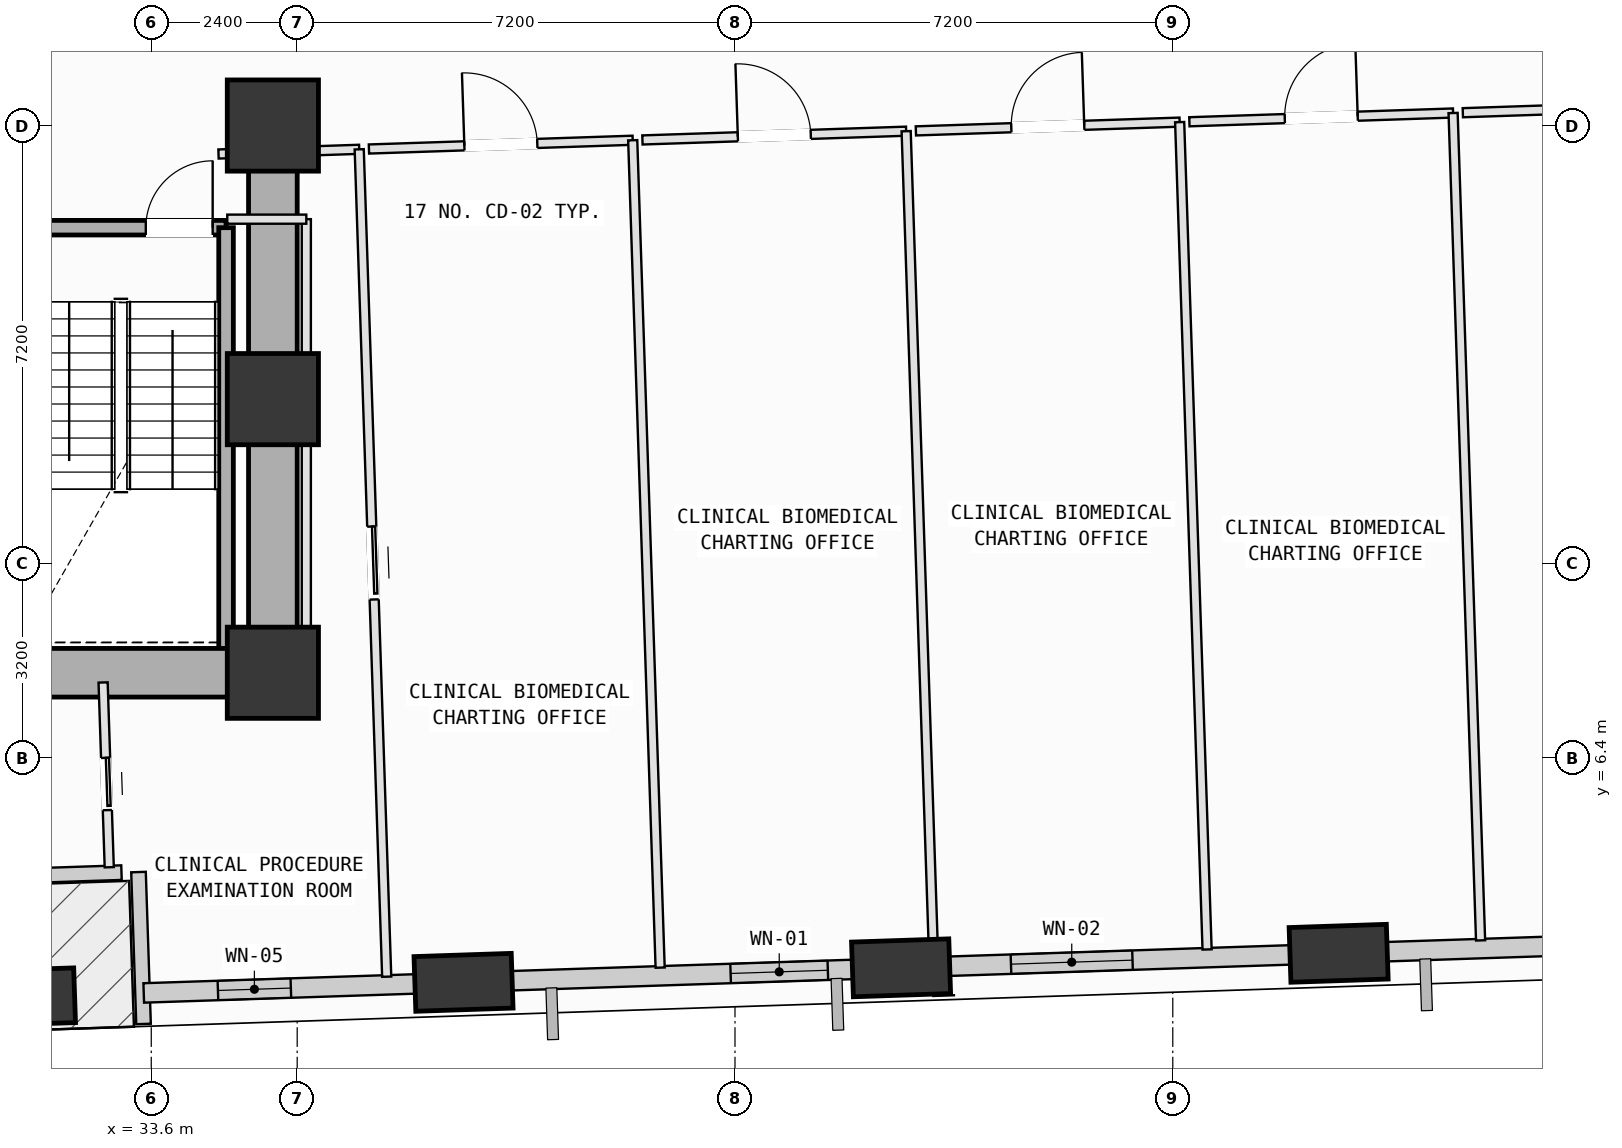
"""IFC4 building model, lengths in metres.
Left out: names, types, materials, properties, quantities, classifications, styles, units other than length and angle.
Written with IfcOpenShell. Run it as: python <this file> out.ifc"""

import sys

from ifc_helpers import new_model, si_unit, direction, frame, frame_2d, origin, origin_2d, place, context, subcontext, project, spatial, rectangle, extrude, element, fill, save


model = new_model("IFC4")
c1 = context("Model", 3, precision=1e-05, world=origin(), true_north=direction((0.0, 1.0)))
c2 = subcontext(c1, "Body", "Model", "MODEL_VIEW")
j1 = project(units=[si_unit("LENGTHUNIT", "METRE"), si_unit("PLANEANGLEUNIT", "RADIAN")], contexts=[c1])
p1 = place(None, origin())
s1 = spatial("IfcSite", under=j1, at=p1, CompositionType="ELEMENT")
p2 = place(p1, origin())
s2 = spatial("IfcBuilding", under=s1, at=p2, CompositionType="ELEMENT")
p3 = place(p2, frame((0.0, 0.0, 31.0)))
s3 = spatial("IfcBuildingStorey", under=s2, at=p3, CompositionType="ELEMENT", Elevation=31.0)
for number, where, z_axis, x_axis in (
    (1, (35.6, 7.8, 0.0), (0.0, 0.0, 1.0), (1.0, 0.0, 0.0)),
    (2, (35.6, 12.3, 0.0), (0.0, 0.0, 1.0), (1.0, 0.0, 0.0)),
    (3, (35.6, 16.8, 0.0), (0.0, 0.0, 1.0), (1.0, 0.0, 0.0)),
):
    element("IfcColumn", number, at=place(p3, frame(where, z_axis=z_axis, x_axis=x_axis)), inside=s3, PredefinedType="COLUMN", context=c2, shape_type="SweptSolid", body=[
        extrude(rectangle(XDim=1.5, YDim=1.5, at=origin_2d()), origin(), (0.0, 0.0, 1.0), 4.0),
    ])
p4 = place(p3, frame((31.539, 2.469, 0.002), z_axis=(0.092271359153, -0.007785586006, 0.995703460339), x_axis=(0.051136235905, 0.998686967769, 0.003070144289)))
e4 = element("IfcColumn", 4, at=p4, inside=s3, PredefinedType="COLUMN", context=c2, shape_type="SweptSolid", body=[
    extrude(rectangle(XDim=1.6, YDim=0.9, at=origin_2d()), origin(), (0.0, 0.0, 1.0), 4.014),
])
p5 = place(p3, frame((38.735, 2.708, 0.002), z_axis=(0.090985631016, 0.021894937945, 0.995611483783), x_axis=(-0.265927712574, 0.963987979471, 0.003102760257)))
e5 = element("IfcColumn", 5, at=p5, inside=s3, PredefinedType="COLUMN", context=c2, shape_type="SweptSolid", body=[
    extrude(rectangle(XDim=1.6, YDim=0.9, at=origin_2d()), origin(), (0.0, 0.0, 1.0), 4.014),
])
p6 = place(p3, frame((45.931, 2.947, 0.002), z_axis=(0.089681088659, 0.051584853842, 0.994633754299), x_axis=(-0.526915084998, 0.849911011221, 0.003430190405)))
e6 = element("IfcColumn", 6, at=p6, inside=s3, PredefinedType="COLUMN", context=c2, shape_type="SweptSolid", body=[
    extrude(rectangle(XDim=1.6, YDim=0.9, at=origin_2d()), origin(), (0.0, 0.0, 1.0), 4.018),
])
p7 = place(p3, frame((53.127, 3.186, 0.002), z_axis=(0.088301732814, 0.081084764267, 0.99278802621), x_axis=(-0.700238789355, 0.713897639235, 0.003974742434)))
e7 = element("IfcColumn", 7, at=p7, inside=s3, PredefinedType="COLUMN", context=c2, shape_type="SweptSolid", body=[
    extrude(rectangle(XDim=1.6, YDim=0.9, at=origin_2d()), origin(), (0.0, 0.0, 1.0), 4.026),
])
p8 = place(p3, frame((33.11, 4.513, 0.0), z_axis=(0.0, 0.0, 1.0), x_axis=(-0.999450421649, -0.033148976852, 0.0)))
e8 = element("IfcWall", 8, at=p8, inside=s3, PredefinedType="SOLIDWALL", context=c2, shape_type="SweptSolid", body=[
    extrude(rectangle(XDim=6.96, YDim=0.24, at=frame_2d((3.48, 0.0))), origin(), (0.0, 0.0, 1.0), 3.165),
])
p9 = place(p8, frame((2.93, 0.0, 0.0)))
e9 = element("IfcOpeningElement", 9, at=p9, cuts=e8, PredefinedType="OPENING", context=c2, shape_type="SweptSolid", body=[
    extrude(rectangle(XDim=1.1, YDim=2.15, at=frame_2d((0.55, 1.075))), frame((0.0, 0.13, 0.0), z_axis=(0.0, -1.0, 0.0), x_axis=(1.0, 0.0, 0.0)), (0.0, 0.0, 1.0), 0.26),
])
p10 = place(p3, frame((33.473, 2.023, 0.0), z_axis=(0.0, 0.0, 1.0), x_axis=(-0.033201031352, 0.999448693789, 0.0)))
e10 = element("IfcWall", 10, at=p10, inside=s3, PredefinedType="SOLIDWALL", context=c2, shape_type="SweptSolid", body=[
    extrude(rectangle(XDim=2.5, YDim=0.24, at=frame_2d((1.25, 0.0))), origin(), (0.0, 0.0, 1.0), 3.165),
])
p11 = place(p3, frame((38.313, 2.694, 0.0), z_axis=(0.0, 0.0, 1.0), x_axis=(-0.999450547825, -0.033145172375, 0.0)))
e11 = element("IfcWall", 11, at=p11, inside=s3, PredefinedType="SOLIDWALL", context=c2, shape_type="SweptSolid", body=[
    extrude(rectangle(XDim=4.839, YDim=0.32, at=frame_2d((2.42, 0.0))), origin(), (0.0, 0.0, 1.0), 3.145),
])
p12 = place(p11, frame((2.418, 0.0, 0.75)))
e12 = element("IfcOpeningElement", 12, at=p12, cuts=e11, PredefinedType="OPENING", context=c2, shape_type="SweptSolid", body=[
    extrude(rectangle(XDim=1.2, YDim=1.75, at=frame_2d((0.6, 0.875))), frame((0.0, 0.17, 0.0), z_axis=(0.0, -1.0, 0.0), x_axis=(1.0, 0.0, 0.0)), (0.0, 0.0, 1.0), 0.34),
])
p13 = place(p3, frame((45.515, 2.933, 0.0), z_axis=(0.0, 0.0, 1.0), x_axis=(-0.999450004557, -0.033161549901, 0.0)))
e13 = element("IfcWall", 13, at=p13, inside=s3, PredefinedType="SOLIDWALL", context=c2, shape_type="SweptSolid", body=[
    extrude(rectangle(XDim=5.993, YDim=0.32, at=frame_2d((2.997, 0.0))), origin(), (0.0, 0.0, 1.0), 3.145),
])
p14 = place(p13, frame((0.789, 0.0, 0.75)))
e14 = element("IfcOpeningElement", 14, at=p14, cuts=e13, PredefinedType="OPENING", context=c2, shape_type="SweptSolid", body=[
    extrude(rectangle(XDim=1.6, YDim=1.95, at=frame_2d((0.8, 0.975))), frame((0.0, 0.17, 0.0), z_axis=(0.0, -1.0, 0.0), x_axis=(1.0, 0.0, 0.0)), (0.0, 0.0, 1.0), 0.34),
])
p15 = place(p3, frame((52.724, 3.172, 0.0), z_axis=(0.0, 0.0, 1.0), x_axis=(-0.999450884899, -0.033135006788, 0.0)))
e15 = element("IfcWall", 15, at=p15, inside=s3, PredefinedType="SOLIDWALL", context=c2, shape_type="SweptSolid", body=[
    extrude(rectangle(XDim=6.012, YDim=0.32, at=frame_2d((3.006, 0.0))), origin(), (0.0, 0.0, 1.0), 2.865),
])
p16 = place(p15, frame((2.988, 0.0, 0.75)))
e16 = element("IfcOpeningElement", 16, at=p16, cuts=e15, PredefinedType="OPENING", context=c2, shape_type="SweptSolid", body=[
    extrude(rectangle(XDim=2.0, YDim=1.95, at=frame_2d((1.0, 0.975))), frame((0.0, 0.17, 0.0), z_axis=(0.0, -1.0, 0.0), x_axis=(1.0, 0.0, 0.0)), (0.0, 0.0, 1.0), 0.34),
])
p17 = place(p3, frame((59.938, 3.412, 0.0), z_axis=(0.0, 0.0, 1.0), x_axis=(-0.999450050227, -0.033160173418, 0.0)))
e17 = element("IfcWall", 17, at=p17, inside=s3, PredefinedType="SOLIDWALL", context=c2, shape_type="SweptSolid", body=[
    extrude(rectangle(XDim=6.045, YDim=0.32, at=frame_2d((3.022, 0.0))), origin(), (0.0, 0.0, 1.0), 2.865),
])
p18 = place(p17, frame((1.361, 0.0, 0.75)))
e18 = element("IfcOpeningElement", 18, at=p18, cuts=e17, PredefinedType="OPENING", context=c2, shape_type="SweptSolid", body=[
    extrude(rectangle(XDim=1.4, YDim=1.85, at=frame_2d((0.7, 0.925))), frame((0.0, 0.17, 0.0), z_axis=(0.0, -1.0, 0.0), x_axis=(1.0, 0.0, 0.0)), (0.0, 0.0, 1.0), 0.34),
])
p19 = place(p3, frame((31.37, 15.12, 0.0), z_axis=(0.0, 0.0, 1.0), x_axis=(1.0, 0.0, 0.0)))
e19 = element("IfcWall", 19, at=p19, inside=s3, PredefinedType="SOLIDWALL", context=c2, shape_type="SweptSolid", body=[
    extrude(rectangle(XDim=3.46, YDim=0.24, at=frame_2d((1.73, 0.0))), origin(), (0.0, 0.0, 1.0), 3.78),
])
p20 = place(p19, frame((2.14, 0.0, 0.0)))
e20 = element("IfcOpeningElement", 20, at=p20, cuts=e19, PredefinedType="OPENING", context=c2, shape_type="SweptSolid", body=[
    extrude(rectangle(XDim=1.1, YDim=2.15, at=frame_2d((0.55, 1.075))), frame((0.0, 0.13, 0.0), z_axis=(0.0, -1.0, 0.0), x_axis=(1.0, 0.0, 0.0)), (0.0, 0.0, 1.0), 0.26),
])
p21 = place(p3, frame((34.83, 15.12, 0.0), z_axis=(0.0, 0.0, 1.0), x_axis=(0.0, -1.0, 0.0)))
e21 = element("IfcWall", 21, at=p21, inside=s3, PredefinedType="SOLIDWALL", context=c2, shape_type="SweptSolid", body=[
    extrude(rectangle(XDim=6.92, YDim=0.24, at=frame_2d((3.46, 0.0))), origin(), (0.0, 0.0, 1.0), 3.78),
])
p22 = place(p3, frame((24.8, 7.8, 0.0), z_axis=(0.0, 0.0, 1.0), x_axis=(1.0, 0.0, 0.0)))
e22 = element("IfcWall", 22, at=p22, inside=s3, PredefinedType="SHEAR", context=c2, shape_type="SweptSolid", body=[
    extrude(rectangle(XDim=10.8, YDim=0.8, at=frame_2d((5.4, 0.0))), origin(), (0.0, 0.0, 1.0), 3.78),
])
p23 = place(p3, frame((35.6, 7.8, 0.0), z_axis=(0.0, 0.0, 1.0), x_axis=(0.0, 1.0, 0.0)))
e23 = element("IfcWall", 23, at=p23, inside=s3, PredefinedType="SHEAR", context=c2, shape_type="SweptSolid", body=[
    extrude(rectangle(XDim=9.0, YDim=0.8, at=frame_2d((4.5, 0.0))), origin(), (0.0, 0.0, 1.0), 3.78),
])
p24 = place(p3, frame((32.808, 7.64, 0.0), z_axis=(0.0, 0.0, 1.0), x_axis=(0.033162435907, -0.999449975159, 0.0)))
e24 = element("IfcWall", 24, at=p24, inside=s3, PredefinedType="PARTITIONING", context=c2, shape_type="SweptSolid", body=[
    extrude(rectangle(XDim=3.041, YDim=0.15, at=frame_2d((1.52, 0.0))), origin(), (0.0, 0.0, 1.0), 3.78),
])
p25 = place(p24, frame((1.24, 0.0, 0.0)))
e25 = element("IfcOpeningElement", 25, at=p25, cuts=e24, PredefinedType="OPENING", context=c2, shape_type="SweptSolid", body=[
    extrude(rectangle(XDim=0.86, YDim=2.06, at=frame_2d((0.43, 1.03))), frame((0.0, 0.085, 0.0), z_axis=(0.0, -1.0, 0.0), x_axis=(1.0, 0.0, 0.0)), (0.0, 0.0, 1.0), 0.17),
])
p26 = place(p3, frame((35.6, 7.5, 0.0), z_axis=(0.0, 0.0, 1.0), x_axis=(1.0, 0.0, 0.0)))
e26 = element("IfcWall", 26, at=p26, inside=s3, PredefinedType="PARTITIONING", context=c2, shape_type="SweptSolid", body=[
    extrude(rectangle(XDim=0.55, YDim=0.15, at=frame_2d((0.275, 0.0))), origin(), (0.0, 0.0, 1.0), 2.865),
])
p27 = place(p3, frame((36.15, 7.5, 0.0), z_axis=(0.0, 0.0, 1.0), x_axis=(0.0, 1.0, 0.0)))
e27 = element("IfcWall", 27, at=p27, inside=s3, PredefinedType="PARTITIONING", context=c2, shape_type="SweptSolid", body=[
    extrude(rectangle(XDim=7.76, YDim=0.15, at=frame_2d((3.88, 0.0))), origin(), (0.0, 0.0, 1.0), 3.78),
])
p28 = place(p3, frame((36.15, 15.26, 0.0), z_axis=(0.0, 0.0, 1.0), x_axis=(-1.0, 0.0, 0.0)))
e28 = element("IfcWall", 28, at=p28, inside=s3, PredefinedType="PARTITIONING", context=c2, shape_type="SweptSolid", body=[
    extrude(rectangle(XDim=1.3, YDim=0.15, at=frame_2d((0.65, 0.0))), origin(), (0.0, 0.0, 1.0), 3.78),
])
p29 = place(p3, frame((34.706, 16.332, 0.0), z_axis=(0.0, 0.0, 1.0), x_axis=(0.999448179147, 0.033216519986, 0.0)))
e29 = element("IfcWall", 29, at=p29, inside=s3, PredefinedType="PARTITIONING", context=c2, shape_type="SweptSolid", body=[
    extrude(rectangle(XDim=2.315, YDim=0.15, at=frame_2d((1.158, 0.0))), origin(), (0.0, 0.0, 1.0), 2.865),
])
p30 = place(p3, frame((37.02, 16.409, 0.0), z_axis=(0.0, 0.0, 1.0), x_axis=(0.033190644995, -0.999449038763, 0.0)))
e30 = element("IfcWall", 30, at=p30, inside=s3, PredefinedType="PARTITIONING", context=c2, shape_type="SweptSolid", body=[
    extrude(rectangle(XDim=13.615, YDim=0.15, at=frame_2d((6.808, 0.0))), origin(), (0.0, 0.0, 1.0), 3.78),
])
p31 = place(p30, frame((6.208, 0.0, 0.0)))
e31 = element("IfcOpeningElement", 31, at=p31, cuts=e30, PredefinedType="OPENING", context=c2, shape_type="SweptSolid", body=[
    extrude(rectangle(XDim=1.2, YDim=2.15, at=frame_2d((0.6, 1.075))), frame((0.0, 0.085, 0.0), z_axis=(0.0, -1.0, 0.0), x_axis=(1.0, 0.0, 0.0)), (0.0, 0.0, 1.0), 0.17),
])
p32 = place(p3, frame((37.18, 16.414, 0.0), z_axis=(0.0, 0.0, 1.0), x_axis=(0.999449206093, 0.03318560592, 0.0)))
e32 = element("IfcWall", 32, at=p32, inside=s3, PredefinedType="PARTITIONING", context=c2, shape_type="SweptSolid", body=[
    extrude(rectangle(XDim=4.341, YDim=0.15, at=frame_2d((2.17, 0.0))), origin(), (0.0, 0.0, 1.0), 3.78),
])
p33 = place(p32, frame((1.57, 0.0, 0.0)))
e33 = element("IfcOpeningElement", 33, at=p33, cuts=e32, PredefinedType="OPENING", context=c2, shape_type="SweptSolid", body=[
    extrude(rectangle(XDim=1.2, YDim=2.15, at=frame_2d((0.6, 1.075))), frame((0.0, 0.085, 0.0), z_axis=(0.0, -1.0, 0.0), x_axis=(1.0, 0.0, 0.0)), (0.0, 0.0, 1.0), 0.17),
])
p34 = place(p3, frame((41.518, 16.558, 0.0), z_axis=(0.0, 0.0, 1.0), x_axis=(0.033118405438, -0.999451435149, 0.0)))
e34 = element("IfcWall", 34, at=p34, inside=s3, PredefinedType="PARTITIONING", context=c2, shape_type="SweptSolid", body=[
    extrude(rectangle(XDim=13.616, YDim=0.15, at=frame_2d((6.808, 0.0))), origin(), (0.0, 0.0, 1.0), 3.78),
])
p35 = place(p3, frame((39.533, 2.505, 0.0), z_axis=(0.0, 0.0, 1.0), x_axis=(-0.999434580293, -0.033623202036, 0.0)))
e35 = element("IfcWall", 35, at=p35, inside=s3, PredefinedType="PARTITIONING", context=c2, shape_type="SweptSolid", body=[
    extrude(rectangle(XDim=1.213, YDim=0.15, at=frame_2d((0.606, 0.0))), origin(), (0.0, 0.0, 1.0), 3.145),
])
p36 = place(p3, frame((41.678, 16.563, 0.0), z_axis=(0.0, 0.0, 1.0), x_axis=(0.999448896244, 0.03319493632, 0.0)))
e36 = element("IfcWall", 36, at=p36, inside=s3, PredefinedType="PARTITIONING", context=c2, shape_type="SweptSolid", body=[
    extrude(rectangle(XDim=4.339, YDim=0.15, at=frame_2d((2.17, 0.0))), origin(), (0.0, 0.0, 1.0), 3.78),
])
p37 = place(p36, frame((1.57, 0.0, 0.0)))
e37 = element("IfcOpeningElement", 37, at=p37, cuts=e36, PredefinedType="OPENING", context=c2, shape_type="SweptSolid", body=[
    extrude(rectangle(XDim=1.2, YDim=2.15, at=frame_2d((0.6, 1.075))), frame((0.0, 0.085, 0.0), z_axis=(0.0, -1.0, 0.0), x_axis=(1.0, 0.0, 0.0)), (0.0, 0.0, 1.0), 0.17),
])
p38 = place(p3, frame((46.015, 16.707, 0.0), z_axis=(0.0, 0.0, 1.0), x_axis=(0.033199113875, -0.999448757485, 0.0)))
e38 = element("IfcWall", 38, at=p38, inside=s3, PredefinedType="PARTITIONING", context=c2, shape_type="SweptSolid", body=[
    extrude(rectangle(XDim=13.98, YDim=0.15, at=frame_2d((6.99, 0.0))), origin(), (0.0, 0.0, 1.0), 3.78),
])
p39 = place(p3, frame((46.479, 2.735, 0.0), z_axis=(0.0, 0.0, 1.0), x_axis=(-0.999432373579, -0.033688731694, 0.0)))
e39 = element("IfcWall", 39, at=p39, inside=s3, PredefinedType="PARTITIONING", context=c2, shape_type="SweptSolid", body=[
    extrude(rectangle(XDim=0.957, YDim=0.15, at=frame_2d((0.478, 0.0))), origin(), (0.0, 0.0, 1.0), 3.165),
])
p40 = place(p3, frame((46.175, 16.712, 0.0), z_axis=(0.0, 0.0, 1.0), x_axis=(0.999449144144, 0.033187471581, 0.0)))
e40 = element("IfcWall", 40, at=p40, inside=s3, PredefinedType="PARTITIONING", context=c2, shape_type="SweptSolid", body=[
    extrude(rectangle(XDim=4.34, YDim=0.15, at=frame_2d((2.17, 0.0))), origin(), (0.0, 0.0, 1.0), 3.78),
])
p41 = place(p40, frame((1.57, 0.0, 0.0)))
e41 = element("IfcOpeningElement", 41, at=p41, cuts=e40, PredefinedType="OPENING", context=c2, shape_type="SweptSolid", body=[
    extrude(rectangle(XDim=1.2, YDim=2.15, at=frame_2d((0.6, 1.075))), frame((0.0, 0.085, 0.0), z_axis=(0.0, -1.0, 0.0), x_axis=(1.0, 0.0, 0.0)), (0.0, 0.0, 1.0), 0.17),
])
p42 = place(p3, frame((50.513, 16.856, 0.0), z_axis=(0.0, 0.0, 1.0), x_axis=(0.033139286129, -0.999450743016, 0.0)))
e42 = element("IfcWall", 42, at=p42, inside=s3, PredefinedType="PARTITIONING", context=c2, shape_type="SweptSolid", body=[
    extrude(rectangle(XDim=13.615, YDim=0.15, at=frame_2d((6.807, 0.0))), origin(), (0.0, 0.0, 1.0), 3.78),
])
p43 = place(p3, frame((50.673, 16.862, 0.0), z_axis=(0.0, 0.0, 1.0), x_axis=(0.999448896244, 0.03319493632, 0.0)))
e43 = element("IfcWall", 43, at=p43, inside=s3, PredefinedType="PARTITIONING", context=c2, shape_type="SweptSolid", body=[
    extrude(rectangle(XDim=4.339, YDim=0.15, at=frame_2d((2.17, 0.0))), origin(), (0.0, 0.0, 1.0), 3.78),
])
p44 = place(p43, frame((1.57, 0.0, 0.0)))
e44 = element("IfcOpeningElement", 44, at=p44, cuts=e43, PredefinedType="OPENING", context=c2, shape_type="SweptSolid", body=[
    extrude(rectangle(XDim=1.2, YDim=2.15, at=frame_2d((0.6, 1.075))), frame((0.0, 0.085, 0.0), z_axis=(0.0, -1.0, 0.0), x_axis=(1.0, 0.0, 0.0)), (0.0, 0.0, 1.0), 0.17),
])
p45 = place(p3, frame((55.01, 17.006, 0.0), z_axis=(0.0, 0.0, 1.0), x_axis=(0.033190050186, -0.999449058516, 0.0)))
e45 = element("IfcWall", 45, at=p45, inside=s3, PredefinedType="PARTITIONING", context=c2, shape_type="SweptSolid", body=[
    extrude(rectangle(XDim=13.616, YDim=0.15, at=frame_2d((6.808, 0.0))), origin(), (0.0, 0.0, 1.0), 3.78),
])
p46 = place(p3, frame((53.905, 2.981, 0.0), z_axis=(0.0, 0.0, 1.0), x_axis=(-0.999446981017, -0.033252550834, 0.0)))
e46 = element("IfcWall", 46, at=p46, inside=s3, PredefinedType="PARTITIONING", context=c2, shape_type="SweptSolid", body=[
    extrude(rectangle(XDim=1.175, YDim=0.15, at=frame_2d((0.587, 0.0))), origin(), (0.0, 0.0, 1.0), 3.78),
])
p47 = place(p3, frame((55.17, 17.011, 0.0), z_axis=(0.0, 0.0, 1.0), x_axis=(0.999449543268, 0.033175449669, 0.0)))
e47 = element("IfcWall", 47, at=p47, inside=s3, PredefinedType="PARTITIONING", context=c2, shape_type="SweptSolid", body=[
    extrude(rectangle(XDim=6.24, YDim=0.15, at=frame_2d((3.12, 0.0))), origin(), (0.0, 0.0, 1.0), 3.78),
])
p48 = place(p47, frame((2.52, 0.0, 0.0)))
e48 = element("IfcOpeningElement", 48, at=p48, cuts=e47, PredefinedType="OPENING", context=c2, shape_type="SweptSolid", body=[
    extrude(rectangle(XDim=1.2, YDim=2.15, at=frame_2d((0.6, 1.075))), frame((0.0, 0.085, 0.0), z_axis=(0.0, -1.0, 0.0), x_axis=(1.0, 0.0, 0.0)), (0.0, 0.0, 1.0), 0.17),
])
p49 = place(p12, origin())
e49 = element("IfcWindow", 49, at=p49, inside=s3, PartitioningType="SINGLE_PANEL", PredefinedType="WINDOW", context=c2, shape_type="SweptSolid", body=[
    extrude(rectangle(XDim=1.2, YDim=1.75, at=frame_2d((0.6, 0.875))), frame((0.0, 0.03, 0.0), z_axis=(0.0, -1.0, 0.0), x_axis=(1.0, 0.0, 0.0)), (0.0, 0.0, 1.0), 0.06),
])
fill(e12, e49)
p50 = place(p14, origin())
e50 = element("IfcWindow", 50, at=p50, inside=s3, PartitioningType="SINGLE_PANEL", PredefinedType="WINDOW", context=c2, shape_type="SweptSolid", body=[
    extrude(rectangle(XDim=1.6, YDim=1.95, at=frame_2d((0.8, 0.975))), frame((0.0, 0.03, 0.0), z_axis=(0.0, -1.0, 0.0), x_axis=(1.0, 0.0, 0.0)), (0.0, 0.0, 1.0), 0.06),
])
fill(e14, e50)
p51 = place(p16, origin())
e51 = element("IfcWindow", 51, at=p51, inside=s3, PartitioningType="SINGLE_PANEL", PredefinedType="WINDOW", context=c2, shape_type="SweptSolid", body=[
    extrude(rectangle(XDim=2.0, YDim=1.95, at=frame_2d((1.0, 0.975))), frame((0.0, 0.03, 0.0), z_axis=(0.0, -1.0, 0.0), x_axis=(1.0, 0.0, 0.0)), (0.0, 0.0, 1.0), 0.06),
])
fill(e16, e51)
p52 = place(p20, origin())
e52 = element("IfcDoor", 52, at=p52, inside=s3, OperationType="SINGLE_SWING_RIGHT", PredefinedType="DOOR", context=c2, shape_type="SweptSolid", body=[
    extrude(rectangle(XDim=1.1, YDim=2.15, at=frame_2d((0.55, 1.075))), frame((0.0, 0.025, 0.0), z_axis=(0.0, -1.0, 0.0), x_axis=(1.0, 0.0, 0.0)), (0.0, 0.0, 1.0), 0.05),
])
fill(e20, e52)
p53 = place(p33, origin())
e53 = element("IfcDoor", 53, at=p53, inside=s3, OperationType="SINGLE_SWING_LEFT", PredefinedType="DOOR", context=c2, shape_type="SweptSolid", body=[
    extrude(rectangle(XDim=1.2, YDim=2.15, at=frame_2d((0.6, 1.075))), frame((0.0, 0.025, 0.0), z_axis=(0.0, -1.0, 0.0), x_axis=(1.0, 0.0, 0.0)), (0.0, 0.0, 1.0), 0.05),
])
fill(e33, e53)
p54 = place(p37, origin())
e54 = element("IfcDoor", 54, at=p54, inside=s3, OperationType="SINGLE_SWING_LEFT", PredefinedType="DOOR", context=c2, shape_type="SweptSolid", body=[
    extrude(rectangle(XDim=1.2, YDim=2.15, at=frame_2d((0.6, 1.075))), frame((0.0, 0.025, 0.0), z_axis=(0.0, -1.0, 0.0), x_axis=(1.0, 0.0, 0.0)), (0.0, 0.0, 1.0), 0.05),
])
fill(e37, e54)
p55 = place(p41, origin())
e55 = element("IfcDoor", 55, at=p55, inside=s3, OperationType="SINGLE_SWING_RIGHT", PredefinedType="DOOR", context=c2, shape_type="SweptSolid", body=[
    extrude(rectangle(XDim=1.2, YDim=2.15, at=frame_2d((0.6, 1.075))), frame((0.0, 0.025, 0.0), z_axis=(0.0, -1.0, 0.0), x_axis=(1.0, 0.0, 0.0)), (0.0, 0.0, 1.0), 0.05),
])
fill(e41, e55)
p56 = place(p44, origin())
e56 = element("IfcDoor", 56, at=p56, inside=s3, OperationType="SINGLE_SWING_RIGHT", PredefinedType="DOOR", context=c2, shape_type="SweptSolid", body=[
    extrude(rectangle(XDim=1.2, YDim=2.15, at=frame_2d((0.6, 1.075))), frame((0.0, 0.025, 0.0), z_axis=(0.0, -1.0, 0.0), x_axis=(1.0, 0.0, 0.0)), (0.0, 0.0, 1.0), 0.05),
])
fill(e44, e56)
p57 = place(p31, origin())
e57 = element("IfcDoor", 57, at=p57, inside=s3, OperationType="SLIDING_TO_LEFT", PredefinedType="DOOR", context=c2, shape_type="SweptSolid", body=[
    extrude(rectangle(XDim=1.2, YDim=2.15, at=frame_2d((0.6, 1.075))), frame((0.0, 0.025, 0.0), z_axis=(0.0, -1.0, 0.0), x_axis=(1.0, 0.0, 0.0)), (0.0, 0.0, 1.0), 0.05),
])
fill(e31, e57)
p58 = place(p25, origin())
e58 = element("IfcDoor", 58, at=p58, inside=s3, OperationType="SLIDING_TO_LEFT", PredefinedType="DOOR", context=c2, shape_type="SweptSolid", body=[
    extrude(rectangle(XDim=0.86, YDim=2.06, at=frame_2d((0.43, 1.03))), frame((0.0, 0.025, 0.0), z_axis=(0.0, -1.0, 0.0), x_axis=(1.0, 0.0, 0.0)), (0.0, 0.0, 1.0), 0.05),
])
fill(e25, e58)
save(model, sys.argv[1])
